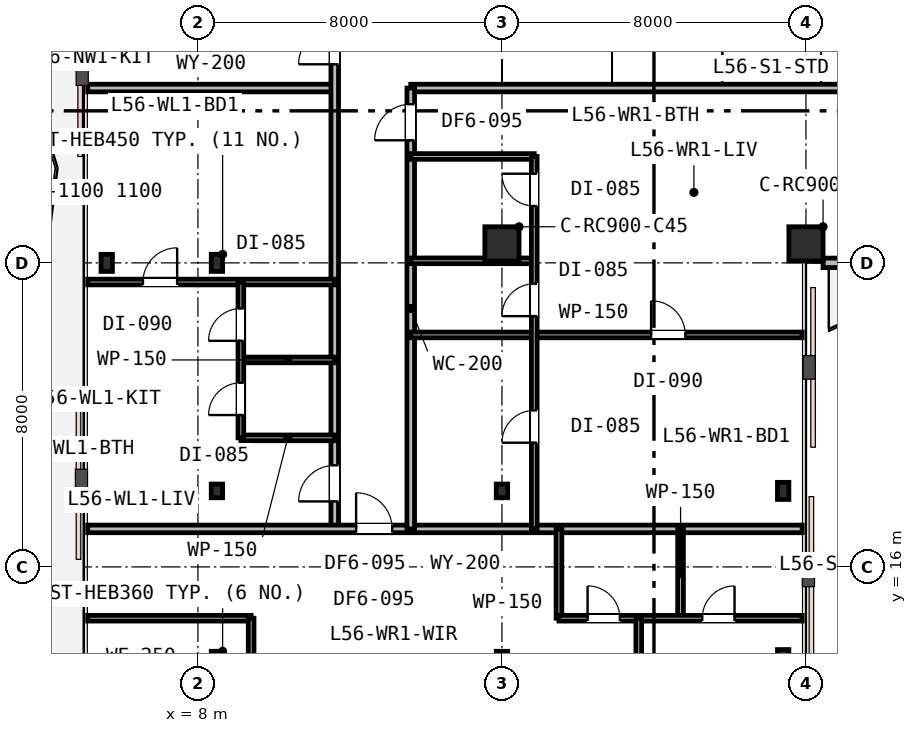
"""IFC4 building model, lengths in metres.
Left out: names, types, materials, properties, quantities, classifications, styles, units other than length and angle.
Written with IfcOpenShell. Run it as: python <this file> out.ifc"""

import sys

from ifc_helpers import new_model, si_unit, direction, frame, frame_2d, origin, origin_2d, place, context, subcontext, project, spatial, rectangle, i_section, extrude, element, fill, save


model = new_model("IFC4")
c1 = context("Model", 3, precision=1e-05, world=origin(), true_north=direction((0.0, 1.0)))
c2 = subcontext(c1, "Body", "Model", "MODEL_VIEW")
j1 = project(units=[si_unit("LENGTHUNIT", "METRE"), si_unit("PLANEANGLEUNIT", "RADIAN")], contexts=[c1])
p1 = place(None, origin())
s1 = spatial("IfcSite", under=j1, at=p1, CompositionType="ELEMENT")
p2 = place(p1, origin())
s2 = spatial("IfcBuilding", under=s1, at=p2, CompositionType="ELEMENT")
p3 = place(p2, frame((0.0, 0.0, 218.4)))
s3 = spatial("IfcBuildingStorey", under=s2, at=p3, CompositionType="ELEMENT", Elevation=218.4)
p4 = place(p3, frame((8.5, 24.0, 0.0), z_axis=(0.0, 0.0, 1.0), x_axis=(1.0, 0.0, 0.0)))
e1 = element("IfcColumn", 1, at=p4, inside=s3, PredefinedType="COLUMN", context=c2, shape_type="SweptSolid", body=[
    extrude(i_section(OverallWidth=0.3, OverallDepth=0.45, WebThickness=0.014, FlangeThickness=0.026, FilletRadius=0.027, at=origin_2d()), origin(), (0.0, 0.0, 1.0), 3.8),
])
for number, where, z_axis, x_axis in (
    (2, (16.0, 24.5, 0.0), (0.0, 0.0, 1.0), (1.0, 0.0, 0.0)),
    (3, (24.0, 24.5, 0.0), (0.0, 0.0, 1.0), (1.0, 0.0, 0.0)),
):
    element("IfcColumn", number, at=place(p3, frame(where, z_axis=z_axis, x_axis=x_axis)), inside=s3, PredefinedType="COLUMN", context=c2, shape_type="SweptSolid", body=[
        extrude(rectangle(XDim=0.9, YDim=0.9, at=origin_2d()), origin(), (0.0, 0.0, 1.0), 3.8),
    ])
for number, where, z_axis, x_axis in (
    (4, (5.6, 24.0, 0.0), (0.0, 0.0, 1.0), (1.0, 0.0, 0.0)),
    (5, (23.4, 13.6, 0.0), (0.0, 0.0, 1.0), (1.0, 0.0, 0.0)),
    (6, (23.4, 18.0, 0.0), (0.0, 0.0, 1.0), (1.0, 0.0, 0.0)),
):
    element("IfcColumn", number, at=place(p3, frame(where, z_axis=z_axis, x_axis=x_axis)), inside=s3, PredefinedType="COLUMN", context=c2, shape_type="SweptSolid", body=[
        extrude(i_section(OverallWidth=0.3, OverallDepth=0.45, WebThickness=0.014, FlangeThickness=0.026, FilletRadius=0.027, at=origin_2d()), origin(), (0.0, 0.0, 1.0), 3.8),
    ])
for number, where, z_axis, x_axis in (
    (7, (8.5, 13.6, 0.0), (0.0, 0.0, 1.0), (1.0, 0.0, 0.0)),
    (8, (16.0, 13.6, 0.0), (0.0, 0.0, 1.0), (1.0, 0.0, 0.0)),
    (9, (8.5, 18.0, 0.0), (0.0, 0.0, 1.0), (1.0, 0.0, 0.0)),
    (10, (16.0, 18.0, 0.0), (0.0, 0.0, 1.0), (1.0, 0.0, 0.0)),
):
    element("IfcColumn", number, at=place(p3, frame(where, z_axis=z_axis, x_axis=x_axis)), inside=s3, PredefinedType="COLUMN", context=c2, shape_type="SweptSolid", body=[
        extrude(i_section(OverallWidth=0.3, OverallDepth=0.36, WebThickness=0.013, FlangeThickness=0.022, FilletRadius=0.027, at=origin_2d()), origin(), (0.0, 0.0, 1.0), 3.8),
    ])
p5 = place(p3, frame((24.45, 24.0, 0.0), z_axis=(0.0, 0.0, 1.0), x_axis=(1.0, 0.0, 0.0)))
e11 = element("IfcWall", 11, at=p5, inside=s3, PredefinedType="STANDARD", context=c2, shape_type="SweptSolid", body=[
    extrude(rectangle(XDim=0.95, YDim=0.25, at=frame_2d((0.475, 0.0))), origin(), (0.0, 0.0, 1.0), 3.24),
])
p6 = place(p3, frame((5.1, 28.6, 0.0), z_axis=(0.0, 0.0, 1.0), x_axis=(1.0, 0.0, 0.0)))
e12 = element("IfcWall", 12, at=p6, inside=s3, PredefinedType="PARTITIONING", context=c2, shape_type="SweptSolid", body=[
    extrude(rectangle(XDim=6.5, YDim=0.2, at=frame_2d((3.25, 0.0))), origin(), (0.0, 0.0, 1.0), 2.92),
])
p7 = place(p3, frame((13.6, 28.6, 0.0), z_axis=(0.0, 0.0, 1.0), x_axis=(1.0, 0.0, 0.0)))
e13 = element("IfcWall", 13, at=p7, inside=s3, PredefinedType="PARTITIONING", context=c2, shape_type="SweptSolid", body=[
    extrude(rectangle(XDim=32.3, YDim=0.2, at=frame_2d((16.15, 0.0))), origin(), (0.0, 0.0, 1.0), 2.92),
])
p8 = place(p7, frame((11.787, 0.0, 0.0)))
e14 = element("IfcOpeningElement", 14, at=p8, cuts=e13, PredefinedType="OPENING", context=c2, shape_type="SweptSolid", body=[
    extrude(rectangle(XDim=0.95, YDim=2.15, at=frame_2d((0.475, 1.075))), frame((0.0, 0.11, 0.0), z_axis=(0.0, -1.0, 0.0), x_axis=(1.0, 0.0, 0.0)), (0.0, 0.0, 1.0), 0.22),
])
p9 = place(p7, frame((25.8, 0.0, 0.0)))
e15 = element("IfcOpeningElement", 15, at=p9, cuts=e13, PredefinedType="OPENING", context=c2, shape_type="SweptSolid", body=[
    extrude(rectangle(XDim=0.95, YDim=2.15, at=frame_2d((0.475, 1.075))), frame((0.0, 0.11, 0.0), z_axis=(0.0, -1.0, 0.0), x_axis=(1.0, 0.0, 0.0)), (0.0, 0.0, 1.0), 0.22),
])
p10 = place(p3, frame((11.6, 17.0, 0.0), z_axis=(0.0, 0.0, 1.0), x_axis=(0.0, 1.0, 0.0)))
e16 = element("IfcWall", 16, at=p10, inside=s3, PredefinedType="PARTITIONING", context=c2, shape_type="SweptSolid", body=[
    extrude(rectangle(XDim=25.9, YDim=0.2, at=frame_2d((12.95, 0.0))), origin(), (0.0, 0.0, 1.0), 2.92),
])
p11 = place(p10, frame((12.225, 0.0, 0.0)))
e17 = element("IfcOpeningElement", 17, at=p11, cuts=e16, PredefinedType="OPENING", context=c2, shape_type="SweptSolid", body=[
    extrude(rectangle(XDim=0.95, YDim=2.15, at=frame_2d((0.475, 1.075))), frame((0.0, 0.11, 0.0), z_axis=(0.0, -1.0, 0.0), x_axis=(1.0, 0.0, 0.0)), (0.0, 0.0, 1.0), 0.22),
])
p12 = place(p10, frame((0.723, 0.0, 0.0)))
e18 = element("IfcOpeningElement", 18, at=p12, cuts=e16, PredefinedType="OPENING", context=c2, shape_type="SweptSolid", body=[
    extrude(rectangle(XDim=0.95, YDim=2.15, at=frame_2d((0.475, 1.075))), frame((0.0, 0.11, 0.0), z_axis=(0.0, -1.0, 0.0), x_axis=(1.0, 0.0, 0.0)), (0.0, 0.0, 1.0), 0.22),
])
p13 = place(p3, frame((5.1, 17.0, 0.0), z_axis=(0.0, 0.0, 1.0), x_axis=(1.0, 0.0, 0.0)))
e19 = element("IfcWall", 19, at=p13, inside=s3, PredefinedType="PARTITIONING", context=c2, shape_type="SweptSolid", body=[
    extrude(rectangle(XDim=18.8, YDim=0.2, at=frame_2d((9.4, 0.0))), origin(), (0.0, 0.0, 1.0), 2.92),
])
p14 = place(p13, frame((7.063, 0.0, 0.0)))
e20 = element("IfcOpeningElement", 20, at=p14, cuts=e19, PredefinedType="OPENING", context=c2, shape_type="SweptSolid", body=[
    extrude(rectangle(XDim=0.95, YDim=2.15, at=frame_2d((0.475, 1.075))), frame((0.0, 0.11, 0.0), z_axis=(0.0, -1.0, 0.0), x_axis=(1.0, 0.0, 0.0)), (0.0, 0.0, 1.0), 0.22),
])
for number, where, z_axis, x_axis in (
    (21, (9.13, 19.396, 0.0), (0.0, 0.0, 1.0), (1.0, 0.0, 0.0)),
    (22, (9.13, 21.446, 0.0), (0.0, 0.0, 1.0), (1.0, 0.0, 0.0)),
):
    element("IfcWall", number, at=place(p3, frame(where, z_axis=z_axis, x_axis=x_axis)), inside=s3, PredefinedType="PARTITIONING", context=c2, shape_type="SweptSolid", body=[
        extrude(rectangle(XDim=2.47, YDim=0.15, at=frame_2d((1.235, 0.0))), origin(), (0.0, 0.0, 1.0), 3.53),
    ])
p15 = place(p3, frame((5.1, 23.496, 0.0), z_axis=(0.0, 0.0, 1.0), x_axis=(1.0, 0.0, 0.0)))
e23 = element("IfcWall", 23, at=p15, inside=s3, PredefinedType="PARTITIONING", context=c2, shape_type="SweptSolid", body=[
    extrude(rectangle(XDim=6.5, YDim=0.15, at=frame_2d((3.25, 0.0))), origin(), (0.0, 0.0, 1.0), 2.92),
])
p16 = place(p15, frame((1.453, 0.0, 0.0)))
e24 = element("IfcOpeningElement", 24, at=p16, cuts=e23, PredefinedType="OPENING", context=c2, shape_type="SweptSolid", body=[
    extrude(rectangle(XDim=0.9, YDim=2.15, at=frame_2d((0.45, 1.075))), frame((0.0, 0.085, 0.0), z_axis=(0.0, -1.0, 0.0), x_axis=(1.0, 0.0, 0.0)), (0.0, 0.0, 1.0), 0.17),
])
p17 = place(p3, frame((9.13, 19.396, 0.0), z_axis=(0.0, 0.0, 1.0), x_axis=(0.0, 1.0, 0.0)))
e25 = element("IfcWall", 25, at=p17, inside=s3, PredefinedType="PARTITIONING", context=c2, shape_type="SweptSolid", body=[
    extrude(rectangle(XDim=4.1, YDim=0.15, at=frame_2d((2.05, 0.0))), origin(), (0.0, 0.0, 1.0), 2.92),
])
p18 = place(p17, frame((0.6, 0.0, 0.0)))
e26 = element("IfcOpeningElement", 26, at=p18, cuts=e25, PredefinedType="OPENING", context=c2, shape_type="SweptSolid", body=[
    extrude(rectangle(XDim=0.85, YDim=2.15, at=frame_2d((0.425, 1.075))), frame((0.0, 0.085, 0.0), z_axis=(0.0, -1.0, 0.0), x_axis=(1.0, 0.0, 0.0)), (0.0, 0.0, 1.0), 0.17),
])
p19 = place(p17, frame((2.553, 0.0, 0.0)))
e27 = element("IfcOpeningElement", 27, at=p19, cuts=e25, PredefinedType="OPENING", context=c2, shape_type="SweptSolid", body=[
    extrude(rectangle(XDim=0.85, YDim=2.15, at=frame_2d((0.425, 1.075))), frame((0.0, 0.085, 0.0), z_axis=(0.0, -1.0, 0.0), x_axis=(1.0, 0.0, 0.0)), (0.0, 0.0, 1.0), 0.17),
])
p20 = place(p3, frame((13.6, 17.0, 0.0), z_axis=(0.0, 0.0, 1.0), x_axis=(0.0, 1.0, 0.0)))
e28 = element("IfcWall", 28, at=p20, inside=s3, PredefinedType="PARTITIONING", context=c2, shape_type="SweptSolid", body=[
    extrude(rectangle(XDim=11.6, YDim=0.2, at=frame_2d((5.8, 0.0))), origin(), (0.0, 0.0, 1.0), 2.92),
])
p21 = place(p20, frame((10.225, 0.0, 0.0)))
e29 = element("IfcOpeningElement", 29, at=p21, cuts=e28, PredefinedType="OPENING", context=c2, shape_type="SweptSolid", body=[
    extrude(rectangle(XDim=0.95, YDim=2.15, at=frame_2d((0.475, 1.075))), frame((0.0, 0.11, 0.0), z_axis=(0.0, -1.0, 0.0), x_axis=(1.0, 0.0, 0.0)), (0.0, 0.0, 1.0), 0.22),
])
p22 = place(p3, frame((13.6, 22.104, 0.0), z_axis=(0.0, 0.0, 1.0), x_axis=(1.0, 0.0, 0.0)))
e30 = element("IfcWall", 30, at=p22, inside=s3, PredefinedType="PARTITIONING", context=c2, shape_type="SweptSolid", body=[
    extrude(rectangle(XDim=10.3, YDim=0.15, at=frame_2d((5.15, 0.0))), origin(), (0.0, 0.0, 1.0), 2.92),
])
p23 = place(p22, frame((6.325, 0.0, 0.0)))
e31 = element("IfcOpeningElement", 31, at=p23, cuts=e30, PredefinedType="OPENING", context=c2, shape_type="SweptSolid", body=[
    extrude(rectangle(XDim=0.9, YDim=2.15, at=frame_2d((0.45, 1.075))), frame((0.0, 0.085, 0.0), z_axis=(0.0, -1.0, 0.0), x_axis=(1.0, 0.0, 0.0)), (0.0, 0.0, 1.0), 0.17),
])
for number, where, z_axis, x_axis in (
    (32, (13.6, 24.054, 0.0), (0.0, 0.0, 1.0), (1.0, 0.0, 0.0)),
    (33, (13.6, 26.8, 0.0), (0.0, 0.0, 1.0), (1.0, 0.0, 0.0)),
):
    element("IfcWall", number, at=place(p3, frame(where, z_axis=z_axis, x_axis=x_axis)), inside=s3, PredefinedType="PARTITIONING", context=c2, shape_type="SweptSolid", body=[
        extrude(rectangle(XDim=3.25, YDim=0.15, at=frame_2d((1.625, 0.0))), origin(), (0.0, 0.0, 1.0), 2.92),
    ])
p24 = place(p3, frame((16.85, 17.0, 0.0), z_axis=(0.0, 0.0, 1.0), x_axis=(0.0, 1.0, 0.0)))
e34 = element("IfcWall", 34, at=p24, inside=s3, PredefinedType="PARTITIONING", context=c2, shape_type="SweptSolid", body=[
    extrude(rectangle(XDim=9.8, YDim=0.15, at=frame_2d((4.9, 0.0))), origin(), (0.0, 0.0, 1.0), 2.92),
])
p25 = place(p24, frame((5.598, 0.0, 0.0)))
e35 = element("IfcOpeningElement", 35, at=p25, cuts=e34, PredefinedType="OPENING", context=c2, shape_type="SweptSolid", body=[
    extrude(rectangle(XDim=0.85, YDim=2.15, at=frame_2d((0.425, 1.075))), frame((0.0, 0.085, 0.0), z_axis=(0.0, -1.0, 0.0), x_axis=(1.0, 0.0, 0.0)), (0.0, 0.0, 1.0), 0.17),
])
p26 = place(p24, frame((8.496, 0.0, 0.0)))
e36 = element("IfcOpeningElement", 36, at=p26, cuts=e34, PredefinedType="OPENING", context=c2, shape_type="SweptSolid", body=[
    extrude(rectangle(XDim=0.85, YDim=2.15, at=frame_2d((0.425, 1.075))), frame((0.0, 0.085, 0.0), z_axis=(0.0, -1.0, 0.0), x_axis=(1.0, 0.0, 0.0)), (0.0, 0.0, 1.0), 0.17),
])
p27 = place(p24, frame((2.268, 0.0, 0.0)))
e37 = element("IfcOpeningElement", 37, at=p27, cuts=e34, PredefinedType="OPENING", context=c2, shape_type="SweptSolid", body=[
    extrude(rectangle(XDim=0.85, YDim=2.15, at=frame_2d((0.425, 1.075))), frame((0.0, 0.085, 0.0), z_axis=(0.0, -1.0, 0.0), x_axis=(1.0, 0.0, 0.0)), (0.0, 0.0, 1.0), 0.17),
])
p28 = place(p3, frame((17.5, 14.65, 0.0), z_axis=(0.0, 0.0, 1.0), x_axis=(0.0, 1.0, 0.0)))
e38 = element("IfcWall", 38, at=p28, inside=s3, PredefinedType="PARTITIONING", context=c2, shape_type="SweptSolid", body=[
    extrude(rectangle(XDim=2.35, YDim=0.15, at=frame_2d((1.175, 0.0))), origin(), (0.0, 0.0, 1.0), 3.53),
])
p29 = place(p3, frame((20.7, 14.65, 0.0), z_axis=(0.0, 0.0, 1.0), x_axis=(0.0, 1.0, 0.0)))
e39 = element("IfcWall", 39, at=p29, inside=s3, PredefinedType="PARTITIONING", context=c2, shape_type="SweptSolid", body=[
    extrude(rectangle(XDim=2.35, YDim=0.15, at=frame_2d((1.175, 0.0))), origin(), (0.0, 0.0, 1.0), 3.22),
])
p30 = place(p3, frame((17.5, 14.65, 0.0), z_axis=(0.0, 0.0, 1.0), x_axis=(1.0, 0.0, 0.0)))
e40 = element("IfcWall", 40, at=p30, inside=s3, PredefinedType="PARTITIONING", context=c2, shape_type="SweptSolid", body=[
    extrude(rectangle(XDim=6.4, YDim=0.15, at=frame_2d((3.2, 0.0))), origin(), (0.0, 0.0, 1.0), 3.22),
])
p31 = place(p30, frame((0.753, 0.0, 0.0)))
e41 = element("IfcOpeningElement", 41, at=p31, cuts=e40, PredefinedType="OPENING", context=c2, shape_type="SweptSolid", body=[
    extrude(rectangle(XDim=0.85, YDim=2.15, at=frame_2d((0.425, 1.075))), frame((0.0, 0.085, 0.0), z_axis=(0.0, -1.0, 0.0), x_axis=(1.0, 0.0, 0.0)), (0.0, 0.0, 1.0), 0.17),
])
p32 = place(p30, frame((3.771, 0.0, 0.0)))
e42 = element("IfcOpeningElement", 42, at=p32, cuts=e40, PredefinedType="OPENING", context=c2, shape_type="SweptSolid", body=[
    extrude(rectangle(XDim=0.85, YDim=2.15, at=frame_2d((0.425, 1.075))), frame((0.0, 0.085, 0.0), z_axis=(0.0, -1.0, 0.0), x_axis=(1.0, 0.0, 0.0)), (0.0, 0.0, 1.0), 0.17),
])
p33 = place(p3, frame((5.1, 14.65, 0.0), z_axis=(0.0, 0.0, 1.0), x_axis=(1.0, 0.0, 0.0)))
e43 = element("IfcWall", 43, at=p33, inside=s3, PredefinedType="PARTITIONING", context=c2, shape_type="SweptSolid", body=[
    extrude(rectangle(XDim=4.3, YDim=0.15, at=frame_2d((2.15, 0.0))), origin(), (0.0, 0.0, 1.0), 2.92),
])
p34 = place(p3, frame((9.4, 10.1, 0.0), z_axis=(0.0, 0.0, 1.0), x_axis=(0.0, 1.0, 0.0)))
e44 = element("IfcWall", 44, at=p34, inside=s3, PredefinedType="PARTITIONING", context=c2, shape_type="SweptSolid", body=[
    extrude(rectangle(XDim=4.55, YDim=0.15, at=frame_2d((2.275, 0.0))), origin(), (0.0, 0.0, 1.0), 2.92),
])
p35 = place(p34, frame((1.365, 0.0, 0.0)))
e45 = element("IfcOpeningElement", 45, at=p35, cuts=e44, PredefinedType="OPENING", context=c2, shape_type="SweptSolid", body=[
    extrude(rectangle(XDim=0.9, YDim=2.15, at=frame_2d((0.45, 1.075))), frame((0.0, 0.085, 0.0), z_axis=(0.0, -1.0, 0.0), x_axis=(1.0, 0.0, 0.0)), (0.0, 0.0, 1.0), 0.17),
])
p36 = place(p3, frame((19.6, 10.1, 0.0), z_axis=(0.0, 0.0, 1.0), x_axis=(0.0, 1.0, 0.0)))
e46 = element("IfcWall", 46, at=p36, inside=s3, PredefinedType="PARTITIONING", context=c2, shape_type="SweptSolid", body=[
    extrude(rectangle(XDim=4.55, YDim=0.15, at=frame_2d((2.275, 0.0))), origin(), (0.0, 0.0, 1.0), 2.92),
])
p37 = place(p36, frame((1.825, 0.0, 0.0)))
e47 = element("IfcOpeningElement", 47, at=p37, cuts=e46, PredefinedType="OPENING", context=c2, shape_type="SweptSolid", body=[
    extrude(rectangle(XDim=0.9, YDim=2.15, at=frame_2d((0.45, 1.075))), frame((0.0, 0.085, 0.0), z_axis=(0.0, -1.0, 0.0), x_axis=(1.0, 0.0, 0.0)), (0.0, 0.0, 1.0), 0.17),
])
p38 = place(p11, origin())
e48 = element("IfcDoor", 48, at=p38, inside=s3, OperationType="SINGLE_SWING_LEFT", PredefinedType="DOOR", context=c2, shape_type="SweptSolid", body=[
    extrude(rectangle(XDim=0.95, YDim=2.15, at=frame_2d((0.475, 1.075))), frame((0.0, 0.025, 0.0), z_axis=(0.0, -1.0, 0.0), x_axis=(1.0, 0.0, 0.0)), (0.0, 0.0, 1.0), 0.05),
])
fill(e17, e48)
p39 = place(p12, origin())
e49 = element("IfcDoor", 49, at=p39, inside=s3, OperationType="SINGLE_SWING_LEFT", PredefinedType="DOOR", context=c2, shape_type="SweptSolid", body=[
    extrude(rectangle(XDim=0.95, YDim=2.15, at=frame_2d((0.475, 1.075))), frame((0.0, 0.025, 0.0), z_axis=(0.0, -1.0, 0.0), x_axis=(1.0, 0.0, 0.0)), (0.0, 0.0, 1.0), 0.05),
])
fill(e18, e49)
p40 = place(p18, origin())
e50 = element("IfcDoor", 50, at=p40, inside=s3, OperationType="SINGLE_SWING_LEFT", PredefinedType="DOOR", context=c2, shape_type="SweptSolid", body=[
    extrude(rectangle(XDim=0.85, YDim=2.15, at=frame_2d((0.425, 1.075))), frame((0.0, 0.025, 0.0), z_axis=(0.0, -1.0, 0.0), x_axis=(1.0, 0.0, 0.0)), (0.0, 0.0, 1.0), 0.05),
])
fill(e26, e50)
p41 = place(p19, origin())
e51 = element("IfcDoor", 51, at=p41, inside=s3, OperationType="SINGLE_SWING_LEFT", PredefinedType="DOOR", context=c2, shape_type="SweptSolid", body=[
    extrude(rectangle(XDim=0.85, YDim=2.15, at=frame_2d((0.425, 1.075))), frame((0.0, 0.025, 0.0), z_axis=(0.0, -1.0, 0.0), x_axis=(1.0, 0.0, 0.0)), (0.0, 0.0, 1.0), 0.05),
])
fill(e27, e51)
p42 = place(p16, origin())
e52 = element("IfcDoor", 52, at=p42, inside=s3, OperationType="SINGLE_SWING_RIGHT", PredefinedType="DOOR", context=c2, shape_type="SweptSolid", body=[
    extrude(rectangle(XDim=0.9, YDim=2.15, at=frame_2d((0.45, 1.075))), frame((0.0, 0.025, 0.0), z_axis=(0.0, -1.0, 0.0), x_axis=(1.0, 0.0, 0.0)), (0.0, 0.0, 1.0), 0.05),
])
fill(e24, e52)
p43 = place(p21, origin())
e53 = element("IfcDoor", 53, at=p43, inside=s3, OperationType="SINGLE_SWING_LEFT", PredefinedType="DOOR", context=c2, shape_type="SweptSolid", body=[
    extrude(rectangle(XDim=0.95, YDim=2.15, at=frame_2d((0.475, 1.075))), frame((0.0, 0.025, 0.0), z_axis=(0.0, -1.0, 0.0), x_axis=(1.0, 0.0, 0.0)), (0.0, 0.0, 1.0), 0.05),
])
fill(e29, e53)
p44 = place(p25, origin())
e54 = element("IfcDoor", 54, at=p44, inside=s3, OperationType="SINGLE_SWING_LEFT", PredefinedType="DOOR", context=c2, shape_type="SweptSolid", body=[
    extrude(rectangle(XDim=0.85, YDim=2.15, at=frame_2d((0.425, 1.075))), frame((0.0, 0.025, 0.0), z_axis=(0.0, -1.0, 0.0), x_axis=(1.0, 0.0, 0.0)), (0.0, 0.0, 1.0), 0.05),
])
fill(e35, e54)
p45 = place(p26, origin())
e55 = element("IfcDoor", 55, at=p45, inside=s3, OperationType="SINGLE_SWING_RIGHT", PredefinedType="DOOR", context=c2, shape_type="SweptSolid", body=[
    extrude(rectangle(XDim=0.85, YDim=2.15, at=frame_2d((0.425, 1.075))), frame((0.0, 0.025, 0.0), z_axis=(0.0, -1.0, 0.0), x_axis=(1.0, 0.0, 0.0)), (0.0, 0.0, 1.0), 0.05),
])
fill(e36, e55)
p46 = place(p27, origin())
e56 = element("IfcDoor", 56, at=p46, inside=s3, OperationType="SINGLE_SWING_LEFT", PredefinedType="DOOR", context=c2, shape_type="SweptSolid", body=[
    extrude(rectangle(XDim=0.85, YDim=2.15, at=frame_2d((0.425, 1.075))), frame((0.0, 0.025, 0.0), z_axis=(0.0, -1.0, 0.0), x_axis=(1.0, 0.0, 0.0)), (0.0, 0.0, 1.0), 0.05),
])
fill(e37, e56)
p47 = place(p23, origin())
e57 = element("IfcDoor", 57, at=p47, inside=s3, OperationType="SINGLE_SWING_LEFT", PredefinedType="DOOR", context=c2, shape_type="SweptSolid", body=[
    extrude(rectangle(XDim=0.9, YDim=2.15, at=frame_2d((0.45, 1.075))), frame((0.0, 0.025, 0.0), z_axis=(0.0, -1.0, 0.0), x_axis=(1.0, 0.0, 0.0)), (0.0, 0.0, 1.0), 0.05),
])
fill(e31, e57)
p48 = place(p14, origin())
e58 = element("IfcDoor", 58, at=p48, inside=s3, OperationType="SINGLE_SWING_LEFT", PredefinedType="DOOR", context=c2, shape_type="SweptSolid", body=[
    extrude(rectangle(XDim=0.95, YDim=2.15, at=frame_2d((0.475, 1.075))), frame((0.0, 0.025, 0.0), z_axis=(0.0, -1.0, 0.0), x_axis=(1.0, 0.0, 0.0)), (0.0, 0.0, 1.0), 0.05),
])
fill(e20, e58)
p49 = place(p31, origin())
e59 = element("IfcDoor", 59, at=p49, inside=s3, OperationType="SINGLE_SWING_LEFT", PredefinedType="DOOR", context=c2, shape_type="SweptSolid", body=[
    extrude(rectangle(XDim=0.85, YDim=2.15, at=frame_2d((0.425, 1.075))), frame((0.0, 0.025, 0.0), z_axis=(0.0, -1.0, 0.0), x_axis=(1.0, 0.0, 0.0)), (0.0, 0.0, 1.0), 0.05),
])
fill(e41, e59)
p50 = place(p32, origin())
e60 = element("IfcDoor", 60, at=p50, inside=s3, OperationType="SINGLE_SWING_RIGHT", PredefinedType="DOOR", context=c2, shape_type="SweptSolid", body=[
    extrude(rectangle(XDim=0.85, YDim=2.15, at=frame_2d((0.425, 1.075))), frame((0.0, 0.025, 0.0), z_axis=(0.0, -1.0, 0.0), x_axis=(1.0, 0.0, 0.0)), (0.0, 0.0, 1.0), 0.05),
])
fill(e42, e60)
save(model, sys.argv[1])
